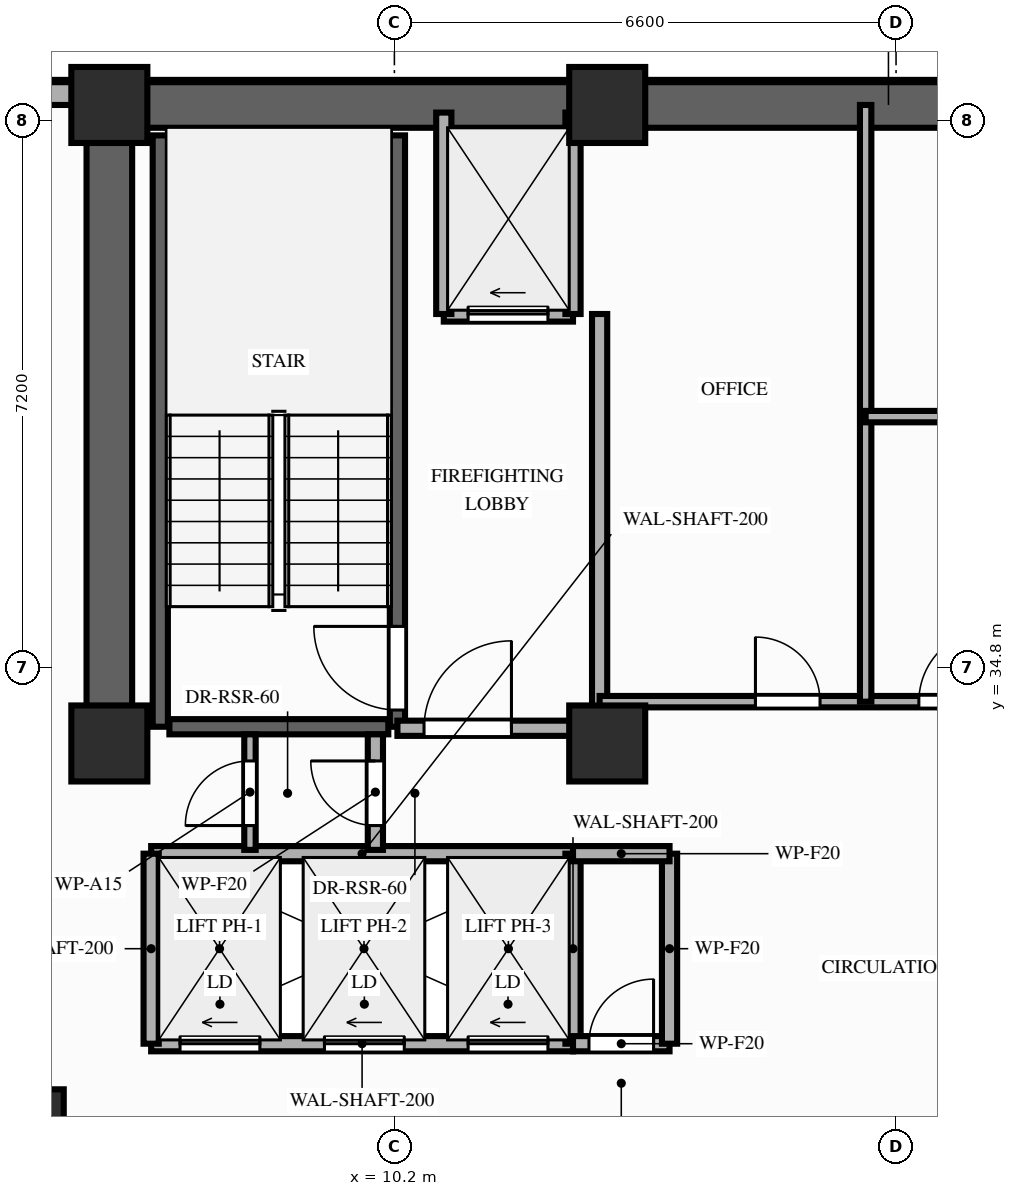
"""IFC4 building model, lengths in metres.
Left out: names, types, materials, properties, quantities, classifications, styles, units other than length and angle.
Written with IfcOpenShell. Run it as: python <this file> out.ifc"""

import sys

from ifc_helpers import new_model, si_unit, direction, frame, frame_2d, origin, origin_2d, place, context, subcontext, project, spatial, rectangle, extrude, element, fill, save


model = new_model("IFC4")
c1 = context("Model", 3, precision=1e-05, world=origin(), true_north=direction((0.0, 1.0)))
c2 = subcontext(c1, "Body", "Model", "MODEL_VIEW")
j1 = project(units=[si_unit("LENGTHUNIT", "METRE"), si_unit("PLANEANGLEUNIT", "RADIAN")], contexts=[c1])
p1 = place(None, origin())
s1 = spatial("IfcSite", under=j1, at=p1, CompositionType="ELEMENT")
p2 = place(p1, origin())
s2 = spatial("IfcBuilding", under=s1, at=p2, CompositionType="ELEMENT")
p3 = place(p2, frame((0.0, 0.0, 172.8)))
s3 = spatial("IfcBuildingStorey", under=s2, at=p3, CompositionType="ELEMENT", Elevation=172.8)
for number, where, z_axis, x_axis in (
    (1, (6.45, 33.8, 0.0), (0.0, 0.0, 1.0), (1.0, 0.0, 0.0)),
    (2, (13.0, 33.8, 0.0), (0.0, 0.0, 1.0), (1.0, 0.0, 0.0)),
    (3, (6.45, 42.2, 0.0), (0.0, 0.0, 1.0), (1.0, 0.0, 0.0)),
    (4, (13.0, 42.2, 0.0), (0.0, 0.0, 1.0), (1.0, 0.0, 0.0)),
):
    element("IfcColumn", number, at=place(p3, frame(where, z_axis=z_axis, x_axis=x_axis)), inside=s3, PredefinedType="COLUMN", context=c2, shape_type="SweptSolid", body=[
        extrude(rectangle(XDim=1.0, YDim=1.0, at=origin_2d()), origin(), (0.0, 0.0, 1.0), 3.2),
    ])
p4 = place(p3, frame((5.4, 28.8, 0.0), z_axis=(0.0, 0.0, 1.0), x_axis=(1.0, 0.0, 0.0)))
e5 = element("IfcColumn", 5, at=p4, inside=s3, PredefinedType="COLUMN", context=c2, shape_type="SweptSolid", body=[
    extrude(rectangle(XDim=0.9, YDim=0.9, at=origin_2d()), origin(), (0.0, 0.0, 1.0), 3.2),
])
p5 = place(p3, frame((6.0, 42.35, 0.0), z_axis=(0.0, 0.0, 1.0), x_axis=(-1.0, 0.0, 0.0)))
e6 = element("IfcWall", 6, at=p5, inside=s3, PredefinedType="STANDARD", context=c2, shape_type="SweptSolid", body=[
    extrude(rectangle(XDim=2.0, YDim=0.3, at=frame_2d((1.0, 0.0))), origin(), (0.0, 0.0, 1.0), 3.02),
])
p6 = place(p3, frame((6.45, 42.2, 0.0), z_axis=(0.0, 0.0, 1.0), x_axis=(1.0, 0.0, 0.0)))
e7 = element("IfcWall", 7, at=p6, inside=s3, PredefinedType="SHEAR", context=c2, shape_type="SweptSolid", body=[
    extrude(rectangle(XDim=20.45, YDim=0.6, at=frame_2d((10.225, 0.0))), origin(), (0.0, 0.0, 1.0), 3.02),
])
p7 = place(p3, frame((6.45, 33.8, 0.0), z_axis=(0.0, 0.0, 1.0), x_axis=(0.0, 1.0, 0.0)))
e8 = element("IfcWall", 8, at=p7, inside=s3, PredefinedType="SHEAR", context=c2, shape_type="SweptSolid", body=[
    extrude(rectangle(XDim=7.95, YDim=0.6, at=frame_2d((3.975, 0.0))), origin(), (0.0, 0.0, 1.0), 3.02),
])
p8 = place(p3, frame((7.12, 34.02, 0.0), z_axis=(0.0, 0.0, 1.0), x_axis=(0.0, 1.0, 0.0)))
e9 = element("IfcWall", 9, at=p8, inside=s3, PredefinedType="SHEAR", context=c2, shape_type="SweptSolid", body=[
    extrude(rectangle(XDim=7.78, YDim=0.2, at=frame_2d((3.89, 0.0))), origin(), (0.0, 0.0, 1.0), 3.02),
])
p9 = place(p3, frame((10.24, 34.02, 0.0), z_axis=(0.0, 0.0, 1.0), x_axis=(0.0, 1.0, 0.0)))
e10 = element("IfcWall", 10, at=p9, inside=s3, PredefinedType="SHEAR", context=c2, shape_type="SweptSolid", body=[
    extrude(rectangle(XDim=7.78, YDim=0.2, at=frame_2d((3.89, 0.0))), origin(), (0.0, 0.0, 1.0), 3.02),
])
p10 = place(p9, frame((0.22, 0.0, 0.0)))
e11 = element("IfcOpeningElement", 11, at=p10, cuts=e10, PredefinedType="OPENING", context=c2, shape_type="SweptSolid", body=[
    extrude(rectangle(XDim=1.1, YDim=2.15, at=frame_2d((0.55, 1.075))), frame((0.0, 0.11, 0.0), z_axis=(0.0, -1.0, 0.0), x_axis=(1.0, 0.0, 0.0)), (0.0, 0.0, 1.0), 0.22),
])
p11 = place(p3, frame((7.24, 34.02, 0.0), z_axis=(0.0, 0.0, 1.0), x_axis=(1.0, 0.0, 0.0)))
e12 = element("IfcWall", 12, at=p11, inside=s3, PredefinedType="SHEAR", context=c2, shape_type="SweptSolid", body=[
    extrude(rectangle(XDim=2.88, YDim=0.2, at=frame_2d((1.44, 0.0))), origin(), (0.0, 0.0, 1.0), 3.02),
])
p12 = place(p3, frame((7.0, 29.85, 0.0), z_axis=(0.0, 0.0, 1.0), x_axis=(1.0, 0.0, 0.0)))
e13 = element("IfcWall", 13, at=p12, inside=s3, PredefinedType="MOVABLE", context=c2, shape_type="SweptSolid", body=[
    extrude(rectangle(XDim=5.55, YDim=0.2, at=frame_2d((2.775, 0.0))), origin(), (0.0, 0.0, 1.0), 3.02),
])
p13 = place(p12, frame((0.38, 0.0, 0.0)))
e14 = element("IfcOpeningElement", 14, at=p13, cuts=e13, PredefinedType="OPENING", context=c2, shape_type="SweptSolid", body=[
    extrude(rectangle(XDim=1.05, YDim=2.15, at=frame_2d((0.525, 1.075))), frame((0.0, 0.11, 0.0), z_axis=(0.0, -1.0, 0.0), x_axis=(1.0, 0.0, 0.0)), (0.0, 0.0, 1.0), 0.22),
])
p14 = place(p12, frame((2.28, 0.0, 0.0)))
e15 = element("IfcOpeningElement", 15, at=p14, cuts=e13, PredefinedType="OPENING", context=c2, shape_type="SweptSolid", body=[
    extrude(rectangle(XDim=1.05, YDim=2.15, at=frame_2d((0.525, 1.075))), frame((0.0, 0.11, 0.0), z_axis=(0.0, -1.0, 0.0), x_axis=(1.0, 0.0, 0.0)), (0.0, 0.0, 1.0), 0.22),
])
p15 = place(p12, frame((4.17, 0.0, 0.0)))
e16 = element("IfcOpeningElement", 16, at=p15, cuts=e13, PredefinedType="OPENING", context=c2, shape_type="SweptSolid", body=[
    extrude(rectangle(XDim=1.05, YDim=2.15, at=frame_2d((0.525, 1.075))), frame((0.0, 0.11, 0.0), z_axis=(0.0, -1.0, 0.0), x_axis=(1.0, 0.0, 0.0)), (0.0, 0.0, 1.0), 0.22),
])
p16 = place(p3, frame((7.0, 32.35, 0.0), z_axis=(0.0, 0.0, 1.0), x_axis=(1.0, 0.0, 0.0)))
e17 = element("IfcWall", 17, at=p16, inside=s3, PredefinedType="MOVABLE", context=c2, shape_type="SweptSolid", body=[
    extrude(rectangle(XDim=5.55, YDim=0.2, at=frame_2d((2.775, 0.0))), origin(), (0.0, 0.0, 1.0), 3.02),
])
for number, where, z_axis, x_axis in (
    (18, (7.0, 29.85, 0.0), (0.0, 0.0, 1.0), (0.0, 1.0, 0.0)),
    (19, (12.55, 29.85, 0.0), (0.0, 0.0, 1.0), (0.0, 1.0, 0.0)),
):
    element("IfcWall", number, at=place(p3, frame(where, z_axis=z_axis, x_axis=x_axis)), inside=s3, PredefinedType="MOVABLE", context=c2, shape_type="SweptSolid", body=[
        extrude(rectangle(XDim=2.5, YDim=0.2, at=frame_2d((1.25, 0.0))), origin(), (0.0, 0.0, 1.0), 3.02),
    ])
p17 = place(p3, frame((10.85, 39.45, 0.0), z_axis=(0.0, 0.0, 1.0), x_axis=(1.0, 0.0, 0.0)))
e20 = element("IfcWall", 20, at=p17, inside=s3, PredefinedType="MOVABLE", context=c2, shape_type="SweptSolid", body=[
    extrude(rectangle(XDim=1.7, YDim=0.2, at=frame_2d((0.85, 0.0))), origin(), (0.0, 0.0, 1.0), 3.02),
])
p18 = place(p17, frame((0.32, 0.0, 0.0)))
e21 = element("IfcOpeningElement", 21, at=p18, cuts=e20, PredefinedType="OPENING", context=c2, shape_type="SweptSolid", body=[
    extrude(rectangle(XDim=1.05, YDim=2.15, at=frame_2d((0.525, 1.075))), frame((0.0, 0.11, 0.0), z_axis=(0.0, -1.0, 0.0), x_axis=(1.0, 0.0, 0.0)), (0.0, 0.0, 1.0), 0.22),
])
for number, where, z_axis, x_axis in (
    (22, (10.85, 39.45, 0.0), (0.0, 0.0, 1.0), (0.0, 1.0, 0.0)),
    (23, (12.55, 39.45, 0.0), (0.0, 0.0, 1.0), (0.0, 1.0, 0.0)),
):
    element("IfcWall", number, at=place(p3, frame(where, z_axis=z_axis, x_axis=x_axis)), inside=s3, PredefinedType="MOVABLE", context=c2, shape_type="SweptSolid", body=[
        extrude(rectangle(XDim=2.65, YDim=0.2, at=frame_2d((1.325, 0.0))), origin(), (0.0, 0.0, 1.0), 2.45),
    ])
p19 = place(p3, frame((12.9, 34.0, 0.0), z_axis=(0.0, 0.0, 1.0), x_axis=(0.0, 1.0, 0.0)))
e24 = element("IfcWall", 24, at=p19, inside=s3, PredefinedType="PARTITIONING", context=c2, shape_type="SweptSolid", body=[
    extrude(rectangle(XDim=5.45, YDim=0.2, at=frame_2d((2.725, 0.0))), origin(), (0.0, 0.0, 1.0), 2.45),
])
p20 = place(p3, frame((10.24, 34.0, 0.0), z_axis=(0.0, 0.0, 1.0), x_axis=(1.0, 0.0, 0.0)))
e25 = element("IfcWall", 25, at=p20, inside=s3, PredefinedType="PARTITIONING", context=c2, shape_type="SweptSolid", body=[
    extrude(rectangle(XDim=2.66, YDim=0.2, at=frame_2d((1.33, 0.0))), origin(), (0.0, 0.0, 1.0), 2.45),
])
p21 = place(p20, frame((0.35, 0.0, 0.0)))
e26 = element("IfcOpeningElement", 26, at=p21, cuts=e25, PredefinedType="OPENING", context=c2, shape_type="SweptSolid", body=[
    extrude(rectangle(XDim=1.15, YDim=2.15, at=frame_2d((0.575, 1.075))), frame((0.0, 0.11, 0.0), z_axis=(0.0, -1.0, 0.0), x_axis=(1.0, 0.0, 0.0)), (0.0, 0.0, 1.0), 0.22),
])
p22 = place(p3, frame((9.95, 32.4, 0.0), z_axis=(0.0, 0.0, 1.0), x_axis=(0.0, 1.0, 0.0)))
e27 = element("IfcWall", 27, at=p22, inside=s3, PredefinedType="PARTITIONING", context=c2, shape_type="SweptSolid", body=[
    extrude(rectangle(XDim=1.52, YDim=0.2, at=frame_2d((0.76, 0.0))), origin(), (0.0, 0.0, 1.0), 2.45),
])
p23 = place(p22, frame((0.32, 0.0, 0.0)))
e28 = element("IfcOpeningElement", 28, at=p23, cuts=e27, PredefinedType="OPENING", context=c2, shape_type="SweptSolid", body=[
    extrude(rectangle(XDim=0.85, YDim=2.05, at=frame_2d((0.425, 1.025))), frame((0.0, 0.11, 0.0), z_axis=(0.0, -1.0, 0.0), x_axis=(1.0, 0.0, 0.0)), (0.0, 0.0, 1.0), 0.22),
])
p24 = place(p3, frame((8.3, 32.4, 0.0), z_axis=(0.0, 0.0, 1.0), x_axis=(0.0, 1.0, 0.0)))
e29 = element("IfcWall", 29, at=p24, inside=s3, PredefinedType="PARTITIONING", context=c2, shape_type="SweptSolid", body=[
    extrude(rectangle(XDim=1.52, YDim=0.15, at=frame_2d((0.76, 0.0))), origin(), (0.0, 0.0, 1.0), 2.45),
])
p25 = place(p24, frame((0.32, 0.0, 0.0)))
e30 = element("IfcOpeningElement", 30, at=p25, cuts=e29, PredefinedType="OPENING", context=c2, shape_type="SweptSolid", body=[
    extrude(rectangle(XDim=0.85, YDim=2.05, at=frame_2d((0.425, 1.025))), frame((0.0, 0.085, 0.0), z_axis=(0.0, -1.0, 0.0), x_axis=(1.0, 0.0, 0.0)), (0.0, 0.0, 1.0), 0.17),
])
p26 = place(p3, frame((12.55, 29.85, 0.0), z_axis=(0.0, 0.0, 1.0), x_axis=(1.0, 0.0, 0.0)))
e31 = element("IfcWall", 31, at=p26, inside=s3, PredefinedType="PARTITIONING", context=c2, shape_type="SweptSolid", body=[
    extrude(rectangle(XDim=1.27, YDim=0.2, at=frame_2d((0.635, 0.0))), origin(), (0.0, 0.0, 1.0), 3.02),
])
p27 = place(p26, frame((0.21, 0.0, 0.0)))
e32 = element("IfcOpeningElement", 32, at=p27, cuts=e31, PredefinedType="OPENING", context=c2, shape_type="SweptSolid", body=[
    extrude(rectangle(XDim=0.85, YDim=2.05, at=frame_2d((0.425, 1.025))), frame((0.0, 0.11, 0.0), z_axis=(0.0, -1.0, 0.0), x_axis=(1.0, 0.0, 0.0)), (0.0, 0.0, 1.0), 0.22),
])
p28 = place(p3, frame((13.82, 29.85, 0.0), z_axis=(0.0, 0.0, 1.0), x_axis=(0.0, 1.0, 0.0)))
e33 = element("IfcWall", 33, at=p28, inside=s3, PredefinedType="PARTITIONING", context=c2, shape_type="SweptSolid", body=[
    extrude(rectangle(XDim=2.5, YDim=0.2, at=frame_2d((1.25, 0.0))), origin(), (0.0, 0.0, 1.0), 3.02),
])
p29 = place(p3, frame((12.55, 32.35, 0.0), z_axis=(0.0, 0.0, 1.0), x_axis=(1.0, 0.0, 0.0)))
e34 = element("IfcWall", 34, at=p29, inside=s3, PredefinedType="PARTITIONING", context=c2, shape_type="SweptSolid", body=[
    extrude(rectangle(XDim=1.27, YDim=0.2, at=frame_2d((0.635, 0.0))), origin(), (0.0, 0.0, 1.0), 3.02),
])
p30 = place(p3, frame((12.9, 34.35, 0.0), z_axis=(0.0, 0.0, 1.0), x_axis=(1.0, 0.0, 0.0)))
e35 = element("IfcWall", 35, at=p30, inside=s3, PredefinedType="PARTITIONING", context=c2, shape_type="SweptSolid", body=[
    extrude(rectangle(XDim=7.6, YDim=0.15, at=frame_2d((3.8, 0.0))), origin(), (0.0, 0.0, 1.0), 3.02),
])
p31 = place(p30, frame((2.05, 0.0, 0.0)))
e36 = element("IfcOpeningElement", 36, at=p31, cuts=e35, PredefinedType="OPENING", context=c2, shape_type="SweptSolid", body=[
    extrude(rectangle(XDim=0.85, YDim=2.05, at=frame_2d((0.425, 1.025))), frame((0.0, 0.085, 0.0), z_axis=(0.0, -1.0, 0.0), x_axis=(1.0, 0.0, 0.0)), (0.0, 0.0, 1.0), 0.17),
])
p32 = place(p30, frame((4.2, 0.0, 0.0)))
e37 = element("IfcOpeningElement", 37, at=p32, cuts=e35, PredefinedType="OPENING", context=c2, shape_type="SweptSolid", body=[
    extrude(rectangle(XDim=0.95, YDim=2.15, at=frame_2d((0.475, 1.075))), frame((0.0, 0.085, 0.0), z_axis=(0.0, -1.0, 0.0), x_axis=(1.0, 0.0, 0.0)), (0.0, 0.0, 1.0), 0.17),
])
p33 = place(p3, frame((16.4, 34.35, 0.0), z_axis=(0.0, 0.0, 1.0), x_axis=(0.0, 1.0, 0.0)))
e38 = element("IfcWall", 38, at=p33, inside=s3, PredefinedType="PARTITIONING", context=c2, shape_type="SweptSolid", body=[
    extrude(rectangle(XDim=7.85, YDim=0.15, at=frame_2d((3.925, 0.0))), origin(), (0.0, 0.0, 1.0), 2.45),
])
p34 = place(p3, frame((16.4, 38.1, 0.0), z_axis=(0.0, 0.0, 1.0), x_axis=(1.0, 0.0, 0.0)))
e39 = element("IfcWall", 39, at=p34, inside=s3, PredefinedType="PARTITIONING", context=c2, shape_type="SweptSolid", body=[
    extrude(rectangle(XDim=4.05, YDim=0.15, at=frame_2d((2.025, 0.0))), origin(), (0.0, 0.0, 1.0), 3.02),
])
p35 = place(p34, frame((1.6, 0.0, 0.0)))
e40 = element("IfcOpeningElement", 40, at=p35, cuts=e39, PredefinedType="OPENING", context=c2, shape_type="SweptSolid", body=[
    extrude(rectangle(XDim=0.85, YDim=2.05, at=frame_2d((0.425, 1.025))), frame((0.0, 0.085, 0.0), z_axis=(0.0, -1.0, 0.0), x_axis=(1.0, 0.0, 0.0)), (0.0, 0.0, 1.0), 0.17),
])
p36 = place(p10, origin())
e41 = element("IfcDoor", 41, at=p36, inside=s3, OperationType="SINGLE_SWING_RIGHT", PredefinedType="DOOR", context=c2, shape_type="SweptSolid", body=[
    extrude(rectangle(XDim=1.1, YDim=2.15, at=frame_2d((0.55, 1.075))), frame((0.0, 0.025, 0.0), z_axis=(0.0, -1.0, 0.0), x_axis=(1.0, 0.0, 0.0)), (0.0, 0.0, 1.0), 0.05),
])
fill(e11, e41)
p37 = place(p13, origin())
e42 = element("IfcDoor", 42, at=p37, inside=s3, OperationType="SLIDING_TO_LEFT", PredefinedType="DOOR", context=c2, shape_type="SweptSolid", body=[
    extrude(rectangle(XDim=1.05, YDim=2.15, at=frame_2d((0.525, 1.075))), frame((0.0, 0.025, 0.0), z_axis=(0.0, -1.0, 0.0), x_axis=(1.0, 0.0, 0.0)), (0.0, 0.0, 1.0), 0.05),
])
fill(e14, e42)
p38 = place(p14, origin())
e43 = element("IfcDoor", 43, at=p38, inside=s3, OperationType="SLIDING_TO_LEFT", PredefinedType="DOOR", context=c2, shape_type="SweptSolid", body=[
    extrude(rectangle(XDim=1.05, YDim=2.15, at=frame_2d((0.525, 1.075))), frame((0.0, 0.025, 0.0), z_axis=(0.0, -1.0, 0.0), x_axis=(1.0, 0.0, 0.0)), (0.0, 0.0, 1.0), 0.05),
])
fill(e15, e43)
p39 = place(p15, origin())
e44 = element("IfcDoor", 44, at=p39, inside=s3, OperationType="SLIDING_TO_LEFT", PredefinedType="DOOR", context=c2, shape_type="SweptSolid", body=[
    extrude(rectangle(XDim=1.05, YDim=2.15, at=frame_2d((0.525, 1.075))), frame((0.0, 0.025, 0.0), z_axis=(0.0, -1.0, 0.0), x_axis=(1.0, 0.0, 0.0)), (0.0, 0.0, 1.0), 0.05),
])
fill(e16, e44)
p40 = place(p18, origin())
e45 = element("IfcDoor", 45, at=p40, inside=s3, OperationType="SLIDING_TO_LEFT", PredefinedType="DOOR", context=c2, shape_type="SweptSolid", body=[
    extrude(rectangle(XDim=1.05, YDim=2.15, at=frame_2d((0.525, 1.075))), frame((0.0, 0.025, 0.0), z_axis=(0.0, -1.0, 0.0), x_axis=(1.0, 0.0, 0.0)), (0.0, 0.0, 1.0), 0.05),
])
fill(e21, e45)
p41 = place(p21, origin())
e46 = element("IfcDoor", 46, at=p41, inside=s3, OperationType="SINGLE_SWING_RIGHT", PredefinedType="DOOR", context=c2, shape_type="SweptSolid", body=[
    extrude(rectangle(XDim=1.15, YDim=2.15, at=frame_2d((0.575, 1.075))), frame((0.0, 0.025, 0.0), z_axis=(0.0, -1.0, 0.0), x_axis=(1.0, 0.0, 0.0)), (0.0, 0.0, 1.0), 0.05),
])
fill(e26, e46)
p42 = place(p23, origin())
e47 = element("IfcDoor", 47, at=p42, inside=s3, OperationType="SINGLE_SWING_RIGHT", PredefinedType="DOOR", context=c2, shape_type="SweptSolid", body=[
    extrude(rectangle(XDim=0.85, YDim=2.05, at=frame_2d((0.425, 1.025))), frame((0.0, 0.025, 0.0), z_axis=(0.0, -1.0, 0.0), x_axis=(1.0, 0.0, 0.0)), (0.0, 0.0, 1.0), 0.05),
])
fill(e28, e47)
p43 = place(p25, origin())
e48 = element("IfcDoor", 48, at=p43, inside=s3, OperationType="SINGLE_SWING_LEFT", PredefinedType="DOOR", context=c2, shape_type="SweptSolid", body=[
    extrude(rectangle(XDim=0.85, YDim=2.05, at=frame_2d((0.425, 1.025))), frame((0.0, 0.025, 0.0), z_axis=(0.0, -1.0, 0.0), x_axis=(1.0, 0.0, 0.0)), (0.0, 0.0, 1.0), 0.05),
])
fill(e30, e48)
p44 = place(p27, origin())
e49 = element("IfcDoor", 49, at=p44, inside=s3, OperationType="SINGLE_SWING_RIGHT", PredefinedType="DOOR", context=c2, shape_type="SweptSolid", body=[
    extrude(rectangle(XDim=0.85, YDim=2.05, at=frame_2d((0.425, 1.025))), frame((0.0, 0.025, 0.0), z_axis=(0.0, -1.0, 0.0), x_axis=(1.0, 0.0, 0.0)), (0.0, 0.0, 1.0), 0.05),
])
fill(e32, e49)
p45 = place(p31, origin())
e50 = element("IfcDoor", 50, at=p45, inside=s3, OperationType="SINGLE_SWING_LEFT", PredefinedType="DOOR", context=c2, shape_type="SweptSolid", body=[
    extrude(rectangle(XDim=0.85, YDim=2.05, at=frame_2d((0.425, 1.025))), frame((0.0, 0.025, 0.0), z_axis=(0.0, -1.0, 0.0), x_axis=(1.0, 0.0, 0.0)), (0.0, 0.0, 1.0), 0.05),
])
fill(e36, e50)
p46 = place(p32, origin())
e51 = element("IfcDoor", 51, at=p46, inside=s3, OperationType="SINGLE_SWING_RIGHT", PredefinedType="DOOR", context=c2, shape_type="SweptSolid", body=[
    extrude(rectangle(XDim=0.95, YDim=2.15, at=frame_2d((0.475, 1.075))), frame((0.0, 0.025, 0.0), z_axis=(0.0, -1.0, 0.0), x_axis=(1.0, 0.0, 0.0)), (0.0, 0.0, 1.0), 0.05),
])
fill(e37, e51)
save(model, sys.argv[1])
